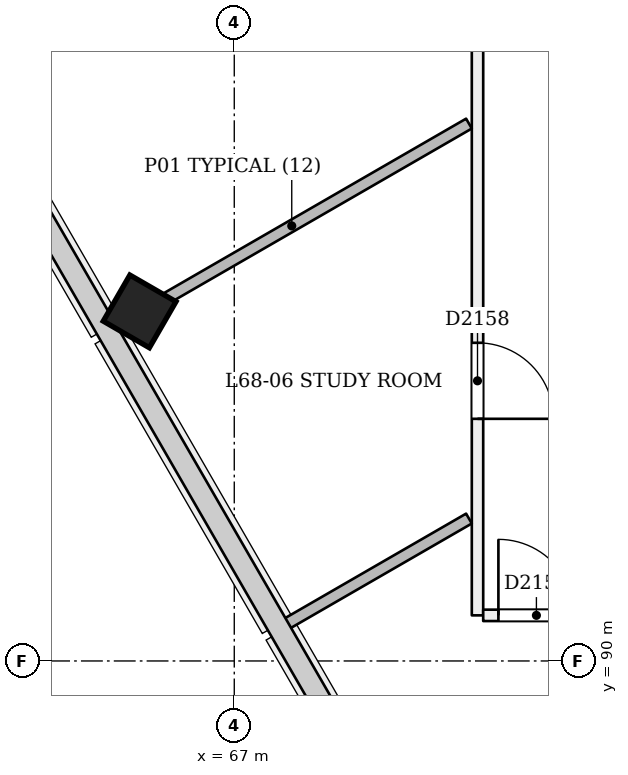
"""IFC4 building model, lengths in metres.
Left out: names, types, materials, properties, quantities, classifications, styles, units other than length and angle.
Written with IfcOpenShell. Run it as: python <this file> out.ifc"""

import sys

from ifc_helpers import new_model, si_unit, direction, frame, frame_2d, origin, origin_2d, place, context, subcontext, project, spatial, rectangle, extrude, element, fill, save


model = new_model("IFC4")
c1 = context("Model", 3, precision=1e-05, world=origin(), true_north=direction((0.0, 1.0)))
c2 = subcontext(c1, "Body", "Model", "MODEL_VIEW")
j1 = project(units=[si_unit("LENGTHUNIT", "METRE"), si_unit("PLANEANGLEUNIT", "RADIAN")], contexts=[c1])
p1 = place(None, origin())
s1 = spatial("IfcSite", under=j1, at=p1, CompositionType="ELEMENT")
p2 = place(p1, origin())
s2 = spatial("IfcBuilding", under=s1, at=p2, CompositionType="ELEMENT")
p3 = place(p2, frame((0.0, 0.0, 264.4)))
s3 = spatial("IfcBuildingStorey", under=s2, at=p3, CompositionType="ELEMENT", Elevation=264.4)
p4 = place(p3, frame((65.728, 94.552, -0.023), z_axis=(0.022212328788, 0.038465252292, 0.999013031354), x_axis=(-0.86563975744, -0.499187423735, 0.03846721103)))
e1 = element("IfcColumn", 1, at=p4, inside=s3, PredefinedType="COLUMN", context=c2, shape_type="SweptSolid", body=[
    extrude(rectangle(XDim=0.7, YDim=0.7, at=origin_2d()), origin(), (0.0, 0.0, 1.0), 3.605),
])
p5 = place(p3, frame((70.2, 98.636, 0.0), z_axis=(0.0, 0.0, 1.0), x_axis=(0.0, -1.0, 0.0)))
e2 = element("IfcWall", 2, at=p5, inside=s3, PredefinedType="PARTITIONING", context=c2, shape_type="SweptSolid", body=[
    extrude(rectangle(XDim=8.036, YDim=0.15, at=frame_2d((4.018, 0.0))), origin(), (0.0, 0.0, 1.0), 3.2),
])
p6 = place(p5, frame((4.45, 0.0, 0.0)))
e3 = element("IfcOpeningElement", 3, at=p6, cuts=e2, PredefinedType="OPENING", context=c2, shape_type="SweptSolid", body=[
    extrude(rectangle(XDim=1.0, YDim=2.1, at=frame_2d((0.5, 1.05))), frame((0.0, 0.085, 0.0), z_axis=(0.0, -1.0, 0.0), x_axis=(1.0, 0.0, 0.0)), (0.0, 0.0, 1.0), 0.171),
])
p7 = place(p3, frame((70.275, 90.6, 0.0), z_axis=(0.0, 0.0, 1.0), x_axis=(1.0, 0.0, 0.0)))
e4 = element("IfcWall", 4, at=p7, inside=s3, PredefinedType="PARTITIONING", context=c2, shape_type="SweptSolid", body=[
    extrude(rectangle(XDim=4.721, YDim=0.15, at=frame_2d((2.361, 0.0))), origin(), (0.0, 0.0, 1.0), 3.2),
])
p8 = place(p7, frame((0.2, 0.0, 0.0)))
e5 = element("IfcOpeningElement", 5, at=p8, cuts=e4, PredefinedType="OPENING", context=c2, shape_type="SweptSolid", body=[
    extrude(rectangle(XDim=1.0, YDim=2.1, at=frame_2d((0.5, 1.05))), frame((0.0, 0.085, 0.0), z_axis=(0.0, -1.0, 0.0), x_axis=(1.0, 0.0, 0.0)), (0.0, 0.0, 1.0), 0.171),
])
p9 = place(p3, frame((65.425, 94.378, 0.0), z_axis=(0.0, 0.0, 1.0), x_axis=(0.866018689825, 0.500011628738, 0.0)))
e6 = element("IfcWall", 6, at=p9, inside=s3, PredefinedType="PARTITIONING", context=c2, shape_type="SweptSolid", body=[
    extrude(rectangle(XDim=5.384, YDim=0.15, at=frame_2d((2.692, 0.0))), origin(), (0.0, 0.0, 1.0), 2.7),
])
p10 = place(p3, frame((67.657, 90.47, 0.0), z_axis=(0.0, 0.0, 1.0), x_axis=(0.866001562501, 0.500041292042, 0.0)))
e7 = element("IfcWall", 7, at=p10, inside=s3, PredefinedType="PARTITIONING", context=c2, shape_type="SweptSolid", body=[
    extrude(rectangle(XDim=2.806, YDim=0.15, at=frame_2d((1.403, 0.0))), origin(), (0.0, 0.0, 1.0), 2.7),
])
p11 = place(p6, origin())
e8 = element("IfcDoor", 8, at=p11, inside=s3, OperationType="SINGLE_SWING_RIGHT", PredefinedType="NOTDEFINED", context=c2, shape_type="SweptSolid", body=[
    extrude(rectangle(XDim=1.0, YDim=2.1, at=frame_2d((0.5, 1.05))), frame((0.0, 0.025, 0.0), z_axis=(0.0, -1.0, 0.0), x_axis=(1.0, 0.0, 0.0)), (0.0, 0.0, 1.0), 0.05),
])
fill(e3, e8)
p12 = place(p8, origin())
e9 = element("IfcDoor", 9, at=p12, inside=s3, OperationType="SINGLE_SWING_LEFT", PredefinedType="NOTDEFINED", context=c2, shape_type="SweptSolid", body=[
    extrude(rectangle(XDim=1.0, YDim=2.1, at=frame_2d((0.5, 1.05))), frame((0.0, 0.025, 0.0), z_axis=(0.0, -1.0, 0.0), x_axis=(1.0, 0.0, 0.0)), (0.0, 0.0, 1.0), 0.05),
])
fill(e5, e9)
save(model, sys.argv[1])
